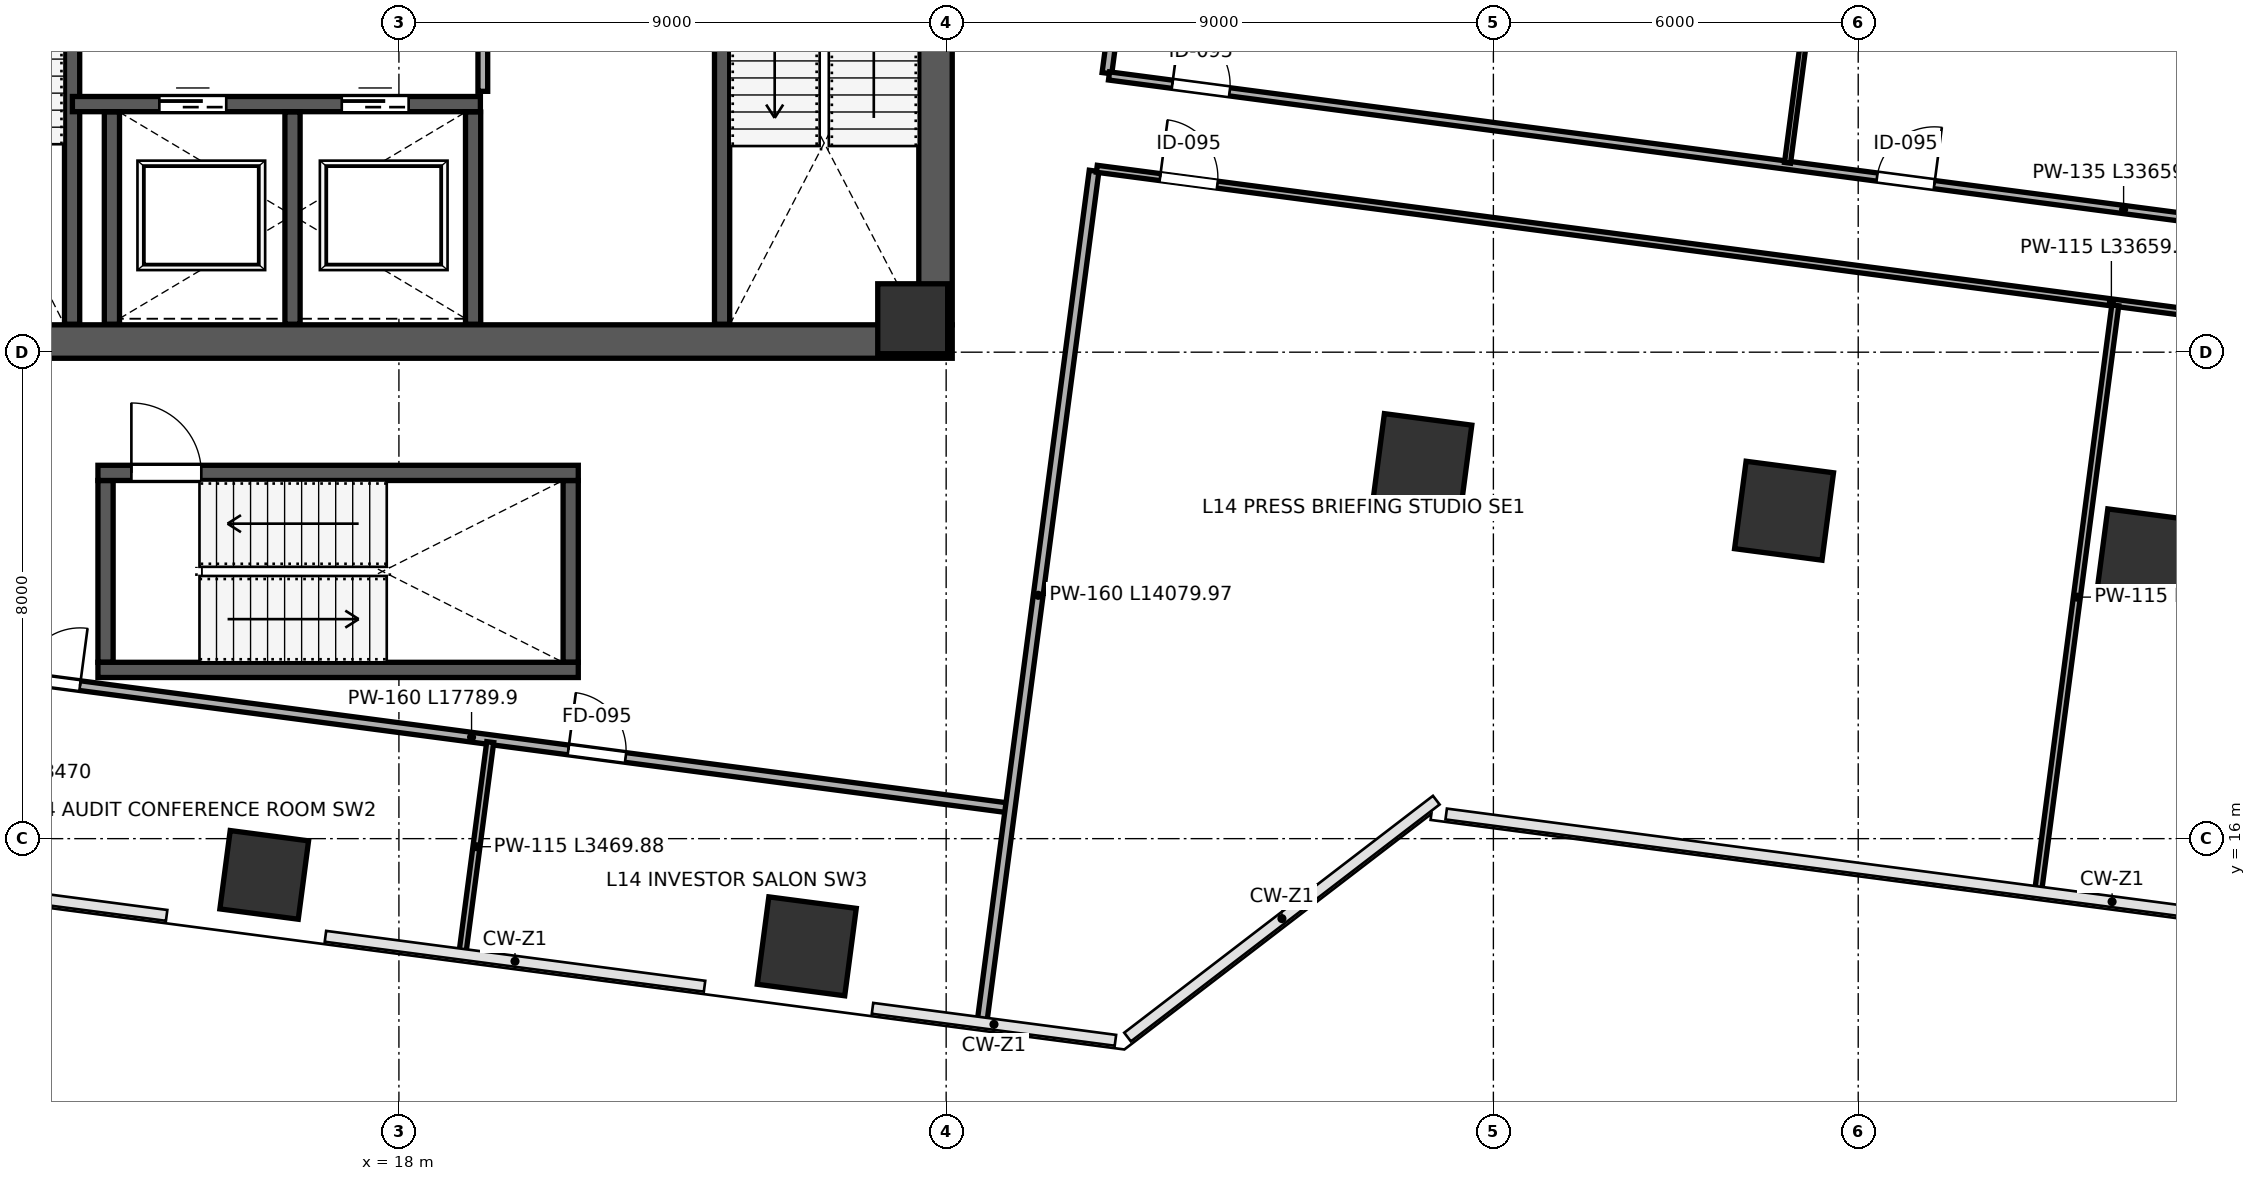
"""IFC4 building model, lengths in metres.
Left out: names, types, materials, properties, quantities, classifications, styles, units other than length and angle.
Written with IfcOpenShell. Run it as: python <this file> out.ifc"""

import sys

from ifc_helpers import new_model, si_unit, direction, frame, frame_2d, origin, origin_2d, place, context, subcontext, project, spatial, rectangle, extrude, clip, halfspace, source, transform, mapped, element, fill, save


model = new_model("IFC4")
c1 = context("Model", 3, precision=1e-05, world=origin(), true_north=direction((0.0, 1.0)))
c2 = subcontext(c1, "Body", "Model", "MODEL_VIEW")
j1 = project(units=[si_unit("LENGTHUNIT", "METRE"), si_unit("PLANEANGLEUNIT", "RADIAN")], contexts=[c1])
p1 = place(None, origin())
s1 = spatial("IfcSite", under=j1, at=p1, CompositionType="ELEMENT")
p2 = place(p1, origin())
s2 = spatial("IfcBuilding", under=s1, at=p2, CompositionType="ELEMENT")
p3 = place(p2, frame((0.0, 0.0, 66.4)))
s3 = spatial("IfcBuildingStorey", under=s2, at=p3, CompositionType="ELEMENT", Elevation=66.4)
m1 = source(origin(), c2, "Body", "SweptSolid", [
    extrude(rectangle(XDim=1.15, YDim=1.15, at=origin_2d()), origin(), (0.0, 0.0, 1.0), 4.199),
])
p4 = place(p3, frame((26.45, 24.55, 0.001), z_axis=(0.0, 0.0, 1.0), x_axis=(1.0, 0.0, 0.0)))
e1 = element("IfcColumn", 1, at=p4, inside=s3, PredefinedType="COLUMN", context=c2, shape_type="MappedRepresentation", body=[
    mapped(m1, transform((0.0, 0.0, 0.0), scale=1.0)),
])
p5 = place(p3, frame((15.785, 15.404, 0.0), z_axis=(-0.085497665031, 0.030505937354, 0.995871245222), x_axis=(0.455606220414, 0.890102566246, 0.011848775584)))
e2 = element("IfcColumn", 2, at=p5, inside=s3, PredefinedType="COLUMN", context=c2, shape_type="Clipping", body=[
    clip(clip(extrude(rectangle(XDim=1.3, YDim=1.3, at=origin_2d()), origin(), (0.0, 0.0, 1.0), 4.218), halfspace(frame((0.0, 0.0, 0.067), z_axis=(0.0, 0.0, -1.0), x_axis=(1.0, 0.0, 0.0)), False)), halfspace(frame((0.0, 0.0, 4.15), z_axis=(0.0, 0.0, 1.0), x_axis=(1.0, 0.0, 0.0)), False)),
])
p6 = place(p3, frame((24.708, 14.229, 0.0), z_axis=(-0.092074402211, -0.015567576489, 0.995630430943), x_axis=(-0.037146527416, 0.999235493433, 0.012188689992)))
e3 = element("IfcColumn", 3, at=p6, inside=s3, PredefinedType="COLUMN", context=c2, shape_type="Clipping", body=[
    clip(clip(extrude(rectangle(XDim=1.45, YDim=1.45, at=origin_2d()), origin(), (0.0, 0.0, 1.0), 4.219), halfspace(frame((0.0, 0.0, 0.077), z_axis=(0.0, 0.0, -1.0), x_axis=(1.0, 0.0, 0.0)), False)), halfspace(frame((0.0, 0.0, 4.142), z_axis=(0.0, 0.0, 1.0), x_axis=(1.0, 0.0, 0.0)), False)),
])
p7 = place(p3, frame((34.832, 22.176, 0.0), z_axis=(-0.051599647604, -0.068452057765, 0.996319121645), x_axis=(-0.713426528526, 0.70064070417, 0.011188925565)))
e4 = element("IfcColumn", 4, at=p7, inside=s3, PredefinedType="COLUMN", context=c2, shape_type="Clipping", body=[
    clip(clip(extrude(rectangle(XDim=1.45, YDim=1.45, at=origin_2d()), origin(), (0.0, 0.0, 1.0), 4.216), halfspace(frame((0.0, 0.0, 0.071), z_axis=(0.0, 0.0, -1.0), x_axis=(1.0, 0.0, 0.0)), False)), halfspace(frame((0.0, 0.0, 4.145), z_axis=(0.0, 0.0, 1.0), x_axis=(1.0, 0.0, 0.0)), False)),
])
p8 = place(p3, frame((40.781, 21.393, 0.0), z_axis=(-0.055844325121, -0.098868132995, 0.993532336479), x_axis=(-0.799477522373, 0.600513133581, 0.014821188128)))
e5 = element("IfcColumn", 5, at=p8, inside=s3, PredefinedType="COLUMN", context=c2, shape_type="Clipping", body=[
    clip(clip(extrude(rectangle(XDim=1.45, YDim=1.45, at=origin_2d()), origin(), (0.0, 0.0, 1.0), 4.228), halfspace(frame((0.0, 0.0, 0.094), z_axis=(0.0, 0.0, -1.0), x_axis=(1.0, 0.0, 0.0)), False)), halfspace(frame((0.0, 0.0, 4.134), z_axis=(0.0, 0.0, 1.0), x_axis=(1.0, 0.0, 0.0)), False)),
])
p9 = place(p3, frame((46.729, 20.61, 0.0), z_axis=(-0.059950544993, -0.129106547951, 0.989816867623), x_axis=(-0.844815048038, 0.534735747326, 0.018579966109)))
e6 = element("IfcColumn", 6, at=p9, inside=s3, PredefinedType="COLUMN", context=c2, shape_type="Clipping", body=[
    clip(clip(extrude(rectangle(XDim=1.45, YDim=1.45, at=origin_2d()), origin(), (0.0, 0.0, 1.0), 4.243), halfspace(frame((0.0, 0.0, 0.118), z_axis=(0.0, 0.0, -1.0), x_axis=(1.0, 0.0, 0.0)), False)), halfspace(frame((0.0, 0.0, 4.126), z_axis=(0.0, 0.0, 1.0), x_axis=(1.0, 0.0, 0.0)), False)),
])
p10 = place(p3, frame((26.825, 24.45, 0.0), z_axis=(0.0, 0.0, 1.0), x_axis=(0.0, 1.0, 0.0)))
e7 = element("IfcWall", 7, at=p10, inside=s3, PredefinedType="SHEAR", context=c2, shape_type="SweptSolid", body=[
    extrude(rectangle(XDim=15.1, YDim=0.55, at=frame_2d((7.55, 0.0))), origin(), (0.0, 0.0, 1.0), 3.96),
])
p11 = place(p10, frame((8.6, 0.0, 0.0)))
e8 = element("IfcOpeningElement", 8, at=p11, cuts=e7, PredefinedType="OPENING", context=c2, shape_type="SweptSolid", body=[
    extrude(rectangle(XDim=1.15, YDim=2.2, at=frame_2d((0.575, 1.1))), frame((0.0, 0.285, 0.0), z_axis=(0.0, -1.0, 0.0), x_axis=(1.0, 0.0, 0.0)), (0.0, 0.0, 1.0), 0.57),
])
p12 = place(p3, frame((8.9, 24.175, 0.0), z_axis=(0.0, 0.0, 1.0), x_axis=(1.0, 0.0, 0.0)))
e9 = element("IfcWall", 9, at=p12, inside=s3, PredefinedType="SHEAR", context=c2, shape_type="SweptSolid", body=[
    extrude(rectangle(XDim=18.2, YDim=0.55, at=frame_2d((9.1, 0.0))), origin(), (0.0, 0.0, 1.0), 3.96),
])
p13 = place(p3, frame((12.625, 24.46, 0.0), z_axis=(0.0, 0.0, 1.0), x_axis=(0.0, 1.0, 0.0)))
e10 = element("IfcWall", 10, at=p13, inside=s3, PredefinedType="SHEAR", context=c2, shape_type="SweptSolid", body=[
    extrude(rectangle(XDim=7.49, YDim=0.25, at=frame_2d((3.745, 0.0))), origin(), (0.0, 0.0, 1.0), 3.96),
])
p14 = place(p13, frame((5.85, 0.0, 0.0)))
e11 = element("IfcOpeningElement", 11, at=p14, cuts=e10, PredefinedType="OPENING", context=c2, shape_type="SweptSolid", body=[
    extrude(rectangle(XDim=1.15, YDim=2.2, at=frame_2d((0.575, 1.1))), frame((0.0, 0.135, 0.0), z_axis=(0.0, -1.0, 0.0), x_axis=(1.0, 0.0, 0.0)), (0.0, 0.0, 1.0), 0.27),
])
p15 = place(p3, frame((23.315, 24.46, 0.0), z_axis=(0.0, 0.0, 1.0), x_axis=(0.0, 1.0, 0.0)))
e12 = element("IfcWall", 12, at=p15, inside=s3, PredefinedType="SHEAR", context=c2, shape_type="SweptSolid", body=[
    extrude(rectangle(XDim=7.49, YDim=0.25, at=frame_2d((3.745, 0.0))), origin(), (0.0, 0.0, 1.0), 3.96),
])
p16 = place(p3, frame((12.63, 28.08, 0.0), z_axis=(0.0, 0.0, 1.0), x_axis=(1.0, 0.0, 0.0)))
e13 = element("IfcWall", 13, at=p16, inside=s3, PredefinedType="SHEAR", context=c2, shape_type="SweptSolid", body=[
    extrude(rectangle(XDim=6.71, YDim=0.25, at=frame_2d((3.355, 0.0))), origin(), (0.0, 0.0, 1.0), 3.96),
])
p17 = place(p16, frame((1.43, 0.0, 0.0)))
e14 = element("IfcOpeningElement", 14, at=p17, cuts=e13, PredefinedType="OPENING", context=c2, shape_type="SweptSolid", body=[
    extrude(rectangle(XDim=1.1, YDim=2.2, at=frame_2d((0.55, 1.1))), frame((0.0, 0.135, 0.0), z_axis=(0.0, -1.0, 0.0), x_axis=(1.0, 0.0, 0.0)), (0.0, 0.0, 1.0), 0.27),
])
p18 = place(p16, frame((4.43, 0.0, 0.0)))
e15 = element("IfcOpeningElement", 15, at=p18, cuts=e13, PredefinedType="OPENING", context=c2, shape_type="SweptSolid", body=[
    extrude(rectangle(XDim=1.1, YDim=2.2, at=frame_2d((0.55, 1.1))), frame((0.0, 0.135, 0.0), z_axis=(0.0, -1.0, 0.0), x_axis=(1.0, 0.0, 0.0)), (0.0, 0.0, 1.0), 0.27),
])
for number, where, z_axis, x_axis in (
    (16, (13.28, 24.46, 0.0), (0.0, 0.0, 1.0), (0.0, 1.0, 0.0)),
    (17, (16.25, 24.46, 0.0), (0.0, 0.0, 1.0), (0.0, 1.0, 0.0)),
    (18, (19.22, 24.46, 0.0), (0.0, 0.0, 1.0), (0.0, 1.0, 0.0)),
):
    element("IfcWall", number, at=place(p3, frame(where, z_axis=z_axis, x_axis=x_axis)), inside=s3, PredefinedType="SHEAR", context=c2, shape_type="SweptSolid", body=[
        extrude(rectangle(XDim=3.49, YDim=0.25, at=frame_2d((1.745, 0.0))), origin(), (0.0, 0.0, 1.0), 3.96),
    ])
for number, where, z_axis, x_axis in (
    (19, (13.175, 18.9, 0.0), (0.0, 0.0, 1.0), (0.0, 1.0, 0.0)),
    (20, (20.825, 18.9, 0.0), (0.0, 0.0, 1.0), (0.0, 1.0, 0.0)),
):
    element("IfcWall", number, at=place(p3, frame(where, z_axis=z_axis, x_axis=x_axis)), inside=s3, PredefinedType="SHEAR", context=c2, shape_type="SweptSolid", body=[
        extrude(rectangle(XDim=2.99, YDim=0.25, at=frame_2d((1.495, 0.0))), origin(), (0.0, 0.0, 1.0), 3.96),
    ])
p19 = place(p3, frame((13.05, 18.775, 0.0), z_axis=(0.0, 0.0, 1.0), x_axis=(1.0, 0.0, 0.0)))
e21 = element("IfcWall", 21, at=p19, inside=s3, PredefinedType="SHEAR", context=c2, shape_type="SweptSolid", body=[
    extrude(rectangle(XDim=7.9, YDim=0.25, at=frame_2d((3.95, 0.0))), origin(), (0.0, 0.0, 1.0), 3.96),
])
p20 = place(p3, frame((13.05, 22.015, 0.0), z_axis=(0.0, 0.0, 1.0), x_axis=(1.0, 0.0, 0.0)))
e22 = element("IfcWall", 22, at=p20, inside=s3, PredefinedType="SHEAR", context=c2, shape_type="SweptSolid", body=[
    extrude(rectangle(XDim=7.9, YDim=0.25, at=frame_2d((3.95, 0.0))), origin(), (0.0, 0.0, 1.0), 3.96),
])
p21 = place(p20, frame((0.55, 0.0, 0.0)))
e23 = element("IfcOpeningElement", 23, at=p21, cuts=e22, PredefinedType="OPENING", context=c2, shape_type="SweptSolid", body=[
    extrude(rectangle(XDim=1.15, YDim=2.2, at=frame_2d((0.575, 1.1))), frame((0.0, 0.135, 0.0), z_axis=(0.0, -1.0, 0.0), x_axis=(1.0, 0.0, 0.0)), (0.0, 0.0, 1.0), 0.27),
])
p22 = place(p3, frame((19.38, 28.29, 0.0), z_axis=(0.0, 0.0, 1.0), x_axis=(0.0, 1.0, 0.0)))
e24 = element("IfcWall", 24, at=p22, inside=s3, PredefinedType="PARTITIONING", context=c2, shape_type="SweptSolid", body=[
    extrude(rectangle(XDim=3.67, YDim=0.16, at=frame_2d((1.835, 0.0))), origin(), (0.0, 0.0, 1.0), 3.96),
])
p23 = place(p22, frame((1.5, 0.0, 0.0)))
e25 = element("IfcOpeningElement", 25, at=p23, cuts=e24, PredefinedType="OPENING", context=c2, shape_type="SweptSolid", body=[
    extrude(rectangle(XDim=0.85, YDim=2.1, at=frame_2d((0.425, 1.05))), frame((0.0, 0.09, 0.0), z_axis=(0.0, -1.0, 0.0), x_axis=(1.0, 0.0, 0.0)), (0.0, 0.0, 1.0), 0.18),
])
p24 = place(p3, frame((10.376, 18.829, 0.0), z_axis=(0.0, 0.0, 1.0), x_axis=(0.99144504436, -0.130524802294, 0.0)))
e26 = element("IfcWall", 26, at=p24, inside=s3, PredefinedType="PARTITIONING", context=c2, shape_type="SweptSolid", body=[
    extrude(rectangle(XDim=17.79, YDim=0.16, at=frame_2d((8.895, 0.0))), origin(), (0.0, 0.0, 1.0), 3.96),
])
p25 = place(p24, frame((1.45, 0.0, 0.0)))
e27 = element("IfcOpeningElement", 27, at=p25, cuts=e26, PredefinedType="OPENING", context=c2, shape_type="SweptSolid", body=[
    extrude(rectangle(XDim=0.95, YDim=2.15, at=frame_2d((0.475, 1.075))), frame((0.0, 0.09, 0.0), z_axis=(0.0, -1.0, 0.0), x_axis=(1.0, 0.0, 0.0)), (0.0, 0.0, 1.0), 0.18),
])
p26 = place(p24, frame((10.5, 0.0, 0.0)))
e28 = element("IfcOpeningElement", 28, at=p26, cuts=e26, PredefinedType="OPENING", context=c2, shape_type="SweptSolid", body=[
    extrude(rectangle(XDim=0.95, YDim=2.15, at=frame_2d((0.475, 1.075))), frame((0.0, 0.09, 0.0), z_axis=(0.0, -1.0, 0.0), x_axis=(1.0, 0.0, 0.0)), (0.0, 0.0, 1.0), 0.18),
])
p27 = place(p3, frame((19.049, 14.147, 0.0), z_axis=(0.0, 0.0, 1.0), x_axis=(0.130518214887, 0.991445911577, 0.0)))
e29 = element("IfcWall", 29, at=p27, inside=s3, PredefinedType="PARTITIONING", context=c2, shape_type="SweptSolid", body=[
    extrude(rectangle(XDim=3.47, YDim=0.115, at=frame_2d((1.735, 0.0))), origin(), (0.0, 0.0, 1.0), 3.095),
])
p28 = place(p3, frame((29.644, 28.588, 0.0), z_axis=(0.0, 0.0, 1.0), x_axis=(0.130525105318, 0.991445004467, 0.0)))
e30 = element("IfcWall", 30, at=p28, inside=s3, PredefinedType="PARTITIONING", context=c2, shape_type="SweptSolid", body=[
    extrude(rectangle(XDim=18.34, YDim=0.16, at=frame_2d((9.17, 0.0))), origin(), (0.0, 0.0, 1.0), 3.095),
])
p29 = place(p3, frame((27.595, 13.022, 0.0), z_axis=(0.0, 0.0, 1.0), x_axis=(0.130532558102, 0.991444023269, 0.0)))
e31 = element("IfcWall", 31, at=p29, inside=s3, PredefinedType="PARTITIONING", context=c2, shape_type="SweptSolid", body=[
    extrude(rectangle(XDim=14.08, YDim=0.16, at=frame_2d((7.04, 0.0))), origin(), (0.0, 0.0, 1.0), 3.96),
])
p30 = place(p3, frame((29.679, 28.543, 0.0), z_axis=(0.0, 0.0, 1.0), x_axis=(0.991444714197, -0.130527310133, 0.0)))
e32 = element("IfcWall", 32, at=p30, inside=s3, PredefinedType="PARTITIONING", context=c2, shape_type="SweptSolid", body=[
    extrude(rectangle(XDim=33.66, YDim=0.135, at=frame_2d((16.83, 0.0))), origin(), (0.0, 0.0, 1.0), 3.095),
])
p31 = place(p30, frame((1.05, 0.0, 0.0)))
e33 = element("IfcOpeningElement", 33, at=p31, cuts=e32, PredefinedType="OPENING", context=c2, shape_type="SweptSolid", body=[
    extrude(rectangle(XDim=0.95, YDim=2.15, at=frame_2d((0.475, 1.075))), frame((0.0, 0.078, 0.0), z_axis=(0.0, -1.0, 0.0), x_axis=(1.0, 0.0, 0.0)), (0.0, 0.0, 1.0), 0.155),
])
p32 = place(p30, frame((12.74, 0.0, 0.0)))
e34 = element("IfcOpeningElement", 34, at=p32, cuts=e32, PredefinedType="OPENING", context=c2, shape_type="SweptSolid", body=[
    extrude(rectangle(XDim=0.95, YDim=2.15, at=frame_2d((0.475, 1.075))), frame((0.0, 0.078, 0.0), z_axis=(0.0, -1.0, 0.0), x_axis=(1.0, 0.0, 0.0)), (0.0, 0.0, 1.0), 0.155),
])
p33 = place(p30, frame((24.04, 0.0, 0.0)))
e35 = element("IfcOpeningElement", 35, at=p33, cuts=e32, PredefinedType="OPENING", context=c2, shape_type="SweptSolid", body=[
    extrude(rectangle(XDim=0.95, YDim=2.15, at=frame_2d((0.475, 1.075))), frame((0.0, 0.078, 0.0), z_axis=(0.0, -1.0, 0.0), x_axis=(1.0, 0.0, 0.0)), (0.0, 0.0, 1.0), 0.155),
])
p34 = place(p3, frame((29.478, 27.016, 0.0), z_axis=(0.0, 0.0, 1.0), x_axis=(0.991444590622, -0.130528248771, 0.0)))
e36 = element("IfcWall", 36, at=p34, inside=s3, PredefinedType="PARTITIONING", context=c2, shape_type="SweptSolid", body=[
    extrude(rectangle(XDim=33.66, YDim=0.115, at=frame_2d((16.83, 0.0))), origin(), (0.0, 0.0, 1.0), 3.095),
])
p35 = place(p34, frame((1.05, 0.0, 0.0)))
e37 = element("IfcOpeningElement", 37, at=p35, cuts=e36, PredefinedType="OPENING", context=c2, shape_type="SweptSolid", body=[
    extrude(rectangle(XDim=0.95, YDim=2.15, at=frame_2d((0.475, 1.075))), frame((0.0, 0.067, 0.0), z_axis=(0.0, -1.0, 0.0), x_axis=(1.0, 0.0, 0.0)), (0.0, 0.0, 1.0), 0.135),
])
p36 = place(p34, frame((18.39, 0.0, 0.0)))
e38 = element("IfcOpeningElement", 38, at=p36, cuts=e36, PredefinedType="OPENING", context=c2, shape_type="SweptSolid", body=[
    extrude(rectangle(XDim=0.95, YDim=2.15, at=frame_2d((0.475, 1.075))), frame((0.0, 0.067, 0.0), z_axis=(0.0, -1.0, 0.0), x_axis=(1.0, 0.0, 0.0)), (0.0, 0.0, 1.0), 0.135),
])
p37 = place(p3, frame((40.838, 27.114, 0.0), z_axis=(0.0, 0.0, 1.0), x_axis=(0.130538190585, 0.991443281685, 0.0)))
e39 = element("IfcWall", 39, at=p37, inside=s3, PredefinedType="PARTITIONING", context=c2, shape_type="SweptSolid", body=[
    extrude(rectangle(XDim=18.34, YDim=0.1, at=frame_2d((9.17, 0.0))), origin(), (0.0, 0.0, 1.0), 3.96),
])
p38 = place(p3, frame((44.964, 15.173, 0.0), z_axis=(0.0, 0.0, 1.0), x_axis=(0.130519754353, 0.991445708914, 0.0)))
e40 = element("IfcWall", 40, at=p38, inside=s3, PredefinedType="PARTITIONING", context=c2, shape_type="SweptSolid", body=[
    extrude(rectangle(XDim=9.68, YDim=0.115, at=frame_2d((4.84, 0.0))), origin(), (0.0, 0.0, 1.0), 3.96),
])
m2 = source(origin(), c2, "Body", "SweptSolid", [
    extrude(rectangle(XDim=1.15, YDim=2.2, at=frame_2d((0.575, 1.1))), frame((0.0, 0.025, 0.0), z_axis=(0.0, -1.0, 0.0), x_axis=(1.0, 0.0, 0.0)), (0.0, 0.0, 1.0), 0.05),
])
p39 = place(p21, origin())
e41 = element("IfcDoor", 41, at=p39, inside=s3, OperationType="SINGLE_SWING_LEFT", PredefinedType="DOOR", context=c2, shape_type="MappedRepresentation", body=[
    mapped(m2, transform((0.0, 0.0, 0.0), scale=1.0)),
])
fill(e23, e41)
m3 = source(origin(), c2, "Body", "SweptSolid", [
    extrude(rectangle(XDim=1.1, YDim=2.2, at=frame_2d((0.55, 1.1))), frame((0.0, 0.025, 0.0), z_axis=(0.0, -1.0, 0.0), x_axis=(1.0, 0.0, 0.0)), (0.0, 0.0, 1.0), 0.05),
])
p40 = place(p17, origin())
e42 = element("IfcDoor", 42, at=p40, inside=s3, OperationType="SLIDING_TO_LEFT", PredefinedType="DOOR", context=c2, shape_type="MappedRepresentation", body=[
    mapped(m3, transform((0.0, 0.0, 0.0), scale=1.0)),
])
fill(e14, e42)
p41 = place(p18, origin())
e43 = element("IfcDoor", 43, at=p41, inside=s3, OperationType="SLIDING_TO_RIGHT", PredefinedType="DOOR", context=c2, shape_type="MappedRepresentation", body=[
    mapped(m3, transform((0.0, 0.0, 0.0), scale=1.0)),
])
fill(e15, e43)
m4 = source(origin(), c2, "Body", "SweptSolid", [
    extrude(rectangle(XDim=0.95, YDim=2.15, at=frame_2d((0.475, 1.075))), frame((0.0, 0.025, 0.0), z_axis=(0.0, -1.0, 0.0), x_axis=(1.0, 0.0, 0.0)), (0.0, 0.0, 1.0), 0.05),
])
p42 = place(p25, origin())
e44 = element("IfcDoor", 44, at=p42, inside=s3, OperationType="SINGLE_SWING_RIGHT", PredefinedType="DOOR", context=c2, shape_type="MappedRepresentation", body=[
    mapped(m4, transform((0.0, 0.0, 0.0), scale=1.0)),
])
fill(e27, e44)
p43 = place(p26, origin())
e45 = element("IfcDoor", 45, at=p43, inside=s3, OperationType="SINGLE_SWING_LEFT", PredefinedType="DOOR", context=c2, shape_type="MappedRepresentation", body=[
    mapped(m4, transform((0.0, 0.0, 0.0), scale=1.0)),
])
fill(e28, e45)
m5 = source(origin(), c2, "Body", "SweptSolid", [
    extrude(rectangle(XDim=0.95, YDim=2.15, at=frame_2d((0.475, 1.075))), frame((0.0, 0.025, 0.0), z_axis=(0.0, -1.0, 0.0), x_axis=(1.0, 0.0, 0.0)), (0.0, 0.0, 1.0), 0.05),
])
p44 = place(p31, origin())
e46 = element("IfcDoor", 46, at=p44, inside=s3, OperationType="SINGLE_SWING_LEFT", PredefinedType="DOOR", context=c2, shape_type="MappedRepresentation", body=[
    mapped(m5, transform((0.0, 0.0, 0.0), scale=1.0)),
])
fill(e33, e46)
p45 = place(p32, origin())
e47 = element("IfcDoor", 47, at=p45, inside=s3, OperationType="SINGLE_SWING_RIGHT", PredefinedType="DOOR", context=c2, shape_type="MappedRepresentation", body=[
    mapped(m5, transform((0.0, 0.0, 0.0), scale=1.0)),
])
fill(e34, e47)
p46 = place(p35, origin())
e48 = element("IfcDoor", 48, at=p46, inside=s3, OperationType="SINGLE_SWING_LEFT", PredefinedType="DOOR", context=c2, shape_type="MappedRepresentation", body=[
    mapped(m5, transform((0.0, 0.0, 0.0), scale=1.0)),
])
fill(e37, e48)
save(model, sys.argv[1])
